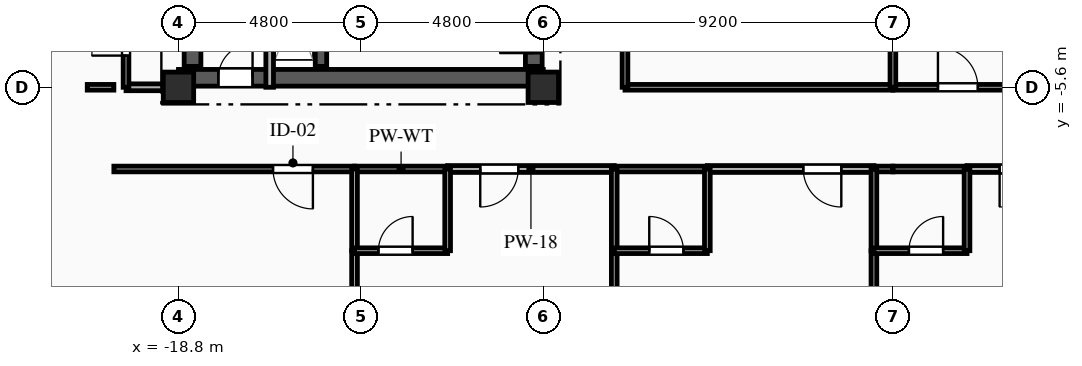
"""IFC4 building model, lengths in metres.
Left out: names, types, materials, properties, quantities, classifications, styles, units other than length and angle.
Written with IfcOpenShell. Run it as: python <this file> out.ifc"""

import sys

from ifc_helpers import new_model, si_unit, direction, frame, frame_2d, origin, origin_2d, place, context, subcontext, project, spatial, rectangle, extrude, element, fill, save


model = new_model("IFC4")
c1 = context("Model", 3, precision=1e-05, world=origin(), true_north=direction((0.0, 1.0)))
c2 = subcontext(c1, "Body", "Model", "MODEL_VIEW")
j1 = project(units=[si_unit("LENGTHUNIT", "METRE"), si_unit("PLANEANGLEUNIT", "RADIAN")], contexts=[c1])
p1 = place(None, origin())
s1 = spatial("IfcSite", under=j1, at=p1, CompositionType="ELEMENT")
p2 = place(p1, origin())
s2 = spatial("IfcBuilding", under=s1, at=p2, CompositionType="ELEMENT")
p3 = place(p2, frame((0.0, 0.0, 245.05)))
s3 = spatial("IfcBuildingStorey", under=s2, at=p3, CompositionType="ELEMENT", Elevation=245.05)
for number, where, z_axis, x_axis in (
    (1, (-18.8, -5.6, 0.0), (0.0, 0.0, 1.0), (1.0, 0.0, 0.0)),
    (2, (-9.2, -5.6, 0.0), (0.0, 0.0, 1.0), (1.0, 0.0, 0.0)),
):
    element("IfcColumn", number, at=place(p3, frame(where, z_axis=z_axis, x_axis=x_axis)), inside=s3, PredefinedType="COLUMN", context=c2, shape_type="SweptSolid", body=[
        extrude(rectangle(XDim=0.8, YDim=0.8, at=origin_2d()), origin(), (0.0, 0.0, 1.0), 3.35),
    ])
p4 = place(p3, frame((-18.8, -5.35, 0.0), z_axis=(0.0, 0.0, 1.0), x_axis=(1.0, 0.0, 0.0)))
e3 = element("IfcWall", 3, at=p4, inside=s3, PredefinedType="SHEAR", context=c2, shape_type="SweptSolid", body=[
    extrude(rectangle(XDim=9.6, YDim=0.44, at=frame_2d((4.8, 0.0))), origin(), (0.0, 0.0, 1.0), 3.04),
])
p5 = place(p4, frame((1.05, 0.0, 0.0)))
e4 = element("IfcOpeningElement", 4, at=p5, cuts=e3, PredefinedType="OPENING", context=c2, shape_type="SweptSolid", body=[
    extrude(rectangle(XDim=0.9, YDim=2.1, at=frame_2d((0.45, 1.05))), frame((0.0, 0.23, 0.0), z_axis=(0.0, -1.0, 0.0), x_axis=(1.0, 0.0, 0.0)), (0.0, 0.0, 1.0), 0.46),
])
p6 = place(p3, frame((-18.43, -5.05, 0.0), z_axis=(0.0, 0.0, 1.0), x_axis=(0.0, 1.0, 0.0)))
e5 = element("IfcWall", 5, at=p6, inside=s3, PredefinedType="SHEAR", context=c2, shape_type="SweptSolid", body=[
    extrude(rectangle(XDim=10.1, YDim=0.44, at=frame_2d((5.05, 0.0))), origin(), (0.0, 0.0, 1.0), 3.04),
])
p7 = place(p3, frame((-9.45, -5.05, 0.0), z_axis=(0.0, 0.0, 1.0), x_axis=(0.0, 1.0, 0.0)))
e6 = element("IfcWall", 6, at=p7, inside=s3, PredefinedType="SHEAR", context=c2, shape_type="SweptSolid", body=[
    extrude(rectangle(XDim=10.1, YDim=0.44, at=frame_2d((5.05, 0.0))), origin(), (0.0, 0.0, 1.0), 3.04),
])
p8 = place(p7, frame((7.15, 0.0, 0.0)))
e7 = element("IfcOpeningElement", 7, at=p8, cuts=e6, PredefinedType="OPENING", context=c2, shape_type="SweptSolid", body=[
    extrude(rectangle(XDim=0.9, YDim=2.1, at=frame_2d((0.45, 1.05))), frame((0.0, 0.23, 0.0), z_axis=(0.0, -1.0, 0.0), x_axis=(1.0, 0.0, 0.0)), (0.0, 0.0, 1.0), 0.46),
])
p9 = place(p7, frame((2.4, 0.0, 0.0)))
e8 = element("IfcOpeningElement", 8, at=p9, cuts=e6, PredefinedType="OPENING", context=c2, shape_type="SweptSolid", body=[
    extrude(rectangle(XDim=1.2, YDim=2.15, at=frame_2d((0.6, 1.075))), frame((0.0, 0.23, 0.0), z_axis=(0.0, -1.0, 0.0), x_axis=(1.0, 0.0, 0.0)), (0.0, 0.0, 1.0), 0.46),
])
p10 = place(p7, frame((0.35, 0.0, 0.0)))
e9 = element("IfcOpeningElement", 9, at=p10, cuts=e6, PredefinedType="OPENING", context=c2, shape_type="SweptSolid", body=[
    extrude(rectangle(XDim=0.9, YDim=2.1, at=frame_2d((0.45, 1.05))), frame((0.0, 0.23, 0.0), z_axis=(0.0, -1.0, 0.0), x_axis=(1.0, 0.0, 0.0)), (0.0, 0.0, 1.0), 0.46),
])
p11 = place(p7, frame((5.0, 0.0, 0.0)))
e10 = element("IfcOpeningElement", 10, at=p11, cuts=e6, PredefinedType="OPENING", context=c2, shape_type="SweptSolid", body=[
    extrude(rectangle(XDim=0.9, YDim=2.1, at=frame_2d((0.45, 1.05))), frame((0.0, 0.23, 0.0), z_axis=(0.0, -1.0, 0.0), x_axis=(1.0, 0.0, 0.0)), (0.0, 0.0, 1.0), 0.46),
])
p12 = place(p3, frame((-15.05, -5.05, 0.0), z_axis=(0.0, 0.0, 1.0), x_axis=(0.0, 1.0, 0.0)))
e11 = element("IfcWall", 11, at=p12, inside=s3, PredefinedType="SHEAR", context=c2, shape_type="SweptSolid", body=[
    extrude(rectangle(XDim=10.1, YDim=0.3, at=frame_2d((5.05, 0.0))), origin(), (0.0, 0.0, 1.0), 3.04),
])
p13 = place(p3, frame((-16.4, -5.6, 0.0), z_axis=(0.0, 0.0, 1.0), x_axis=(0.0, 1.0, 0.0)))
e12 = element("IfcWall", 12, at=p13, inside=s3, PredefinedType="PARTITIONING", context=c2, shape_type="SweptSolid", body=[
    extrude(rectangle(XDim=3.49, YDim=0.2, at=frame_2d((1.745, 0.0))), origin(), (0.0, 0.0, 1.0), 3.04),
])
p14 = place(p3, frame((-20.18, -5.6, 0.0), z_axis=(0.0, 0.0, 1.0), x_axis=(1.0, 0.0, 0.0)))
e13 = element("IfcWall", 13, at=p14, inside=s3, PredefinedType="PARTITIONING", context=c2, shape_type="SweptSolid", body=[
    extrude(rectangle(XDim=1.38, YDim=0.18, at=frame_2d((0.69, 0.0))), origin(), (0.0, 0.0, 1.0), 3.04),
])
p15 = place(p3, frame((-21.2, -5.6, 0.0), z_axis=(0.0, 0.0, 1.0), x_axis=(1.0, 0.0, 0.0)))
e14 = element("IfcWall", 14, at=p15, inside=s3, PredefinedType="PLUMBINGWALL", context=c2, shape_type="SweptSolid", body=[
    extrude(rectangle(XDim=0.7, YDim=0.15, at=frame_2d((0.35, 0.0))), origin(), (0.0, 0.0, 1.0), 3.04),
])
p16 = place(p3, frame((-14.167, -7.75, 0.0), z_axis=(0.0, 0.0, 1.0), x_axis=(-1.0, 0.0, 0.0)))
e15 = element("IfcWall", 15, at=p16, inside=s3, PredefinedType="PARTITIONING", context=c2, shape_type="SweptSolid", body=[
    extrude(rectangle(XDim=6.333, YDim=0.15, at=frame_2d((3.167, 0.0))), origin(), (0.0, 0.0, 1.0), 3.04),
])
p17 = place(p16, frame((1.095, 0.0, 0.0)))
e16 = element("IfcOpeningElement", 16, at=p17, cuts=e15, PredefinedType="OPENING", context=c2, shape_type="SweptSolid", body=[
    extrude(rectangle(XDim=1.05, YDim=2.15, at=frame_2d((0.525, 1.075))), frame((0.0, 0.085, 0.0), z_axis=(0.0, -1.0, 0.0), x_axis=(1.0, 0.0, 0.0)), (0.0, 0.0, 1.0), 0.17),
])
p18 = place(p3, frame((-7.333, -7.75, 0.0), z_axis=(0.0, 0.0, 1.0), x_axis=(-1.0, 0.0, 0.0)))
e17 = element("IfcWall", 17, at=p18, inside=s3, PredefinedType="PARTITIONING", context=c2, shape_type="SweptSolid", body=[
    extrude(rectangle(XDim=4.384, YDim=0.18, at=frame_2d((2.192, 0.0))), origin(), (0.0, 0.0, 1.0), 3.04),
])
p19 = place(p18, frame((2.526, 0.0, 0.0)))
e18 = element("IfcOpeningElement", 18, at=p19, cuts=e17, PredefinedType="OPENING", context=c2, shape_type="SweptSolid", body=[
    extrude(rectangle(XDim=1.0, YDim=2.15, at=frame_2d((0.5, 1.075))), frame((0.0, 0.1, 0.0), z_axis=(0.0, -1.0, 0.0), x_axis=(1.0, 0.0, 0.0)), (0.0, 0.0, 1.0), 0.2),
])
p20 = place(p3, frame((-11.717, -7.75, 0.0), z_axis=(0.0, 0.0, 1.0), x_axis=(-1.0, 0.0, 0.0)))
e19 = element("IfcWall", 19, at=p20, inside=s3, PredefinedType="PLUMBINGWALL", context=c2, shape_type="SweptSolid", body=[
    extrude(rectangle(XDim=2.45, YDim=0.15, at=frame_2d((1.225, 0.0))), origin(), (0.0, 0.0, 1.0), 3.04),
])
p21 = place(p3, frame((-0.5, -7.75, 0.0), z_axis=(0.0, 0.0, 1.0), x_axis=(-1.0, 0.0, 0.0)))
e20 = element("IfcWall", 20, at=p21, inside=s3, PredefinedType="PARTITIONING", context=c2, shape_type="SweptSolid", body=[
    extrude(rectangle(XDim=4.383, YDim=0.18, at=frame_2d((2.191, 0.0))), origin(), (0.0, 0.0, 1.0), 3.04),
])
p22 = place(p21, frame((0.858, 0.0, 0.0)))
e21 = element("IfcOpeningElement", 21, at=p22, cuts=e20, PredefinedType="OPENING", context=c2, shape_type="SweptSolid", body=[
    extrude(rectangle(XDim=1.0, YDim=2.15, at=frame_2d((0.5, 1.075))), frame((0.0, 0.1, 0.0), z_axis=(0.0, -1.0, 0.0), x_axis=(1.0, 0.0, 0.0)), (0.0, 0.0, 1.0), 0.2),
])
p23 = place(p3, frame((-4.883, -7.75, 0.0), z_axis=(0.0, 0.0, 1.0), x_axis=(-1.0, 0.0, 0.0)))
e22 = element("IfcWall", 22, at=p23, inside=s3, PredefinedType="PLUMBINGWALL", context=c2, shape_type="SweptSolid", body=[
    extrude(rectangle(XDim=2.45, YDim=0.15, at=frame_2d((1.225, 0.0))), origin(), (0.0, 0.0, 1.0), 3.04),
])
p24 = place(p3, frame((0.0, -7.75, 0.0), z_axis=(0.0, 0.0, 1.0), x_axis=(-1.0, 0.0, 0.0)))
e23 = element("IfcWall", 23, at=p24, inside=s3, PredefinedType="PLUMBINGWALL", context=c2, shape_type="SweptSolid", body=[
    extrude(rectangle(XDim=0.5, YDim=0.15, at=frame_2d((0.25, 0.0))), origin(), (0.0, 0.0, 1.0), 3.04),
])
p25 = place(p3, frame((-7.05, -5.6, 0.0), z_axis=(0.0, 0.0, 1.0), x_axis=(1.0, 0.0, 0.0)))
e24 = element("IfcWall", 24, at=p25, inside=s3, PredefinedType="PARTITIONING", context=c2, shape_type="SweptSolid", body=[
    extrude(rectangle(XDim=7.05, YDim=0.15, at=frame_2d((3.525, 0.0))), origin(), (0.0, 0.0, 1.0), 2.525),
])
p26 = place(p3, frame((6.333, -7.75, 0.0), z_axis=(0.0, 0.0, 1.0), x_axis=(-1.0, 0.0, 0.0)))
e25 = element("IfcWall", 25, at=p26, inside=s3, PredefinedType="PARTITIONING", context=c2, shape_type="SweptSolid", body=[
    extrude(rectangle(XDim=4.383, YDim=0.18, at=frame_2d((2.191, 0.0))), origin(), (0.0, 0.0, 1.0), 3.04),
])
p27 = place(p26, frame((2.525, 0.0, 0.0)))
e26 = element("IfcOpeningElement", 26, at=p27, cuts=e25, PredefinedType="OPENING", context=c2, shape_type="SweptSolid", body=[
    extrude(rectangle(XDim=1.0, YDim=2.15, at=frame_2d((0.5, 1.075))), frame((0.0, 0.1, 0.0), z_axis=(0.0, -1.0, 0.0), x_axis=(1.0, 0.0, 0.0)), (0.0, 0.0, 1.0), 0.2),
])
p28 = place(p3, frame((1.95, -7.75, 0.0), z_axis=(0.0, 0.0, 1.0), x_axis=(-1.0, 0.0, 0.0)))
e27 = element("IfcWall", 27, at=p28, inside=s3, PredefinedType="PLUMBINGWALL", context=c2, shape_type="SweptSolid", body=[
    extrude(rectangle(XDim=1.95, YDim=0.15, at=frame_2d((0.975, 0.0))), origin(), (0.0, 0.0, 1.0), 3.04),
])
p29 = place(p3, frame((0.0, -5.6, 0.0), z_axis=(0.0, 0.0, 1.0), x_axis=(1.0, 0.0, 0.0)))
e28 = element("IfcWall", 28, at=p29, inside=s3, PredefinedType="PARTITIONING", context=c2, shape_type="SweptSolid", body=[
    extrude(rectangle(XDim=7.05, YDim=0.15, at=frame_2d((3.525, 0.0))), origin(), (0.0, 0.0, 1.0), 2.525),
])
p30 = place(p29, frame((1.185, 0.0, 0.0)))
e29 = element("IfcOpeningElement", 29, at=p30, cuts=e28, PredefinedType="OPENING", context=c2, shape_type="SweptSolid", body=[
    extrude(rectangle(XDim=1.05, YDim=2.15, at=frame_2d((0.525, 1.075))), frame((0.0, 0.085, 0.0), z_axis=(0.0, -1.0, 0.0), x_axis=(1.0, 0.0, 0.0)), (0.0, 0.0, 1.0), 0.17),
])
p31 = place(p3, frame((-7.05, 8.5, 0.0), z_axis=(0.0, 0.0, 1.0), x_axis=(0.0, -1.0, 0.0)))
e30 = element("IfcWall", 30, at=p31, inside=s3, PredefinedType="PARTITIONING", context=c2, shape_type="SweptSolid", body=[
    extrude(rectangle(XDim=14.1, YDim=0.15, at=frame_2d((7.05, 0.0))), origin(), (0.0, 0.0, 1.0), 3.04),
])
p32 = place(p31, frame((8.011, 0.0, 0.0)))
e31 = element("IfcOpeningElement", 31, at=p32, cuts=e30, PredefinedType="OPENING", context=c2, shape_type="SweptSolid", body=[
    extrude(rectangle(XDim=1.05, YDim=2.15, at=frame_2d((0.525, 1.075))), frame((0.0, 0.085, 0.0), z_axis=(0.0, -1.0, 0.0), x_axis=(1.0, 0.0, 0.0)), (0.0, 0.0, 1.0), 0.17),
])
p33 = place(p3, frame((-20.18, -5.6, 0.0), z_axis=(0.0, 0.0, 1.0), x_axis=(0.0, 1.0, 0.0)))
e32 = element("IfcWall", 32, at=p33, inside=s3, PredefinedType="PLUMBINGWALL", context=c2, shape_type="SweptSolid", body=[
    extrude(rectangle(XDim=2.35, YDim=0.15, at=frame_2d((1.175, 0.0))), origin(), (0.0, 0.0, 1.0), 3.04),
])
p34 = place(p33, frame((0.834, 0.0, 0.0)))
e33 = element("IfcOpeningElement", 33, at=p34, cuts=e32, PredefinedType="OPENING", context=c2, shape_type="SweptSolid", body=[
    extrude(rectangle(XDim=0.9, YDim=2.1, at=frame_2d((0.45, 1.05))), frame((0.0, 0.085, 0.0), z_axis=(0.0, -1.0, 0.0), x_axis=(1.0, 0.0, 0.0)), (0.0, 0.0, 1.0), 0.17),
])
p35 = place(p3, frame((-14.167, -9.9, 0.0), z_axis=(0.0, 0.0, 1.0), x_axis=(0.0, -1.0, 0.0)))
e34 = element("IfcWall", 34, at=p35, inside=s3, PredefinedType="PARTITIONING", context=c2, shape_type="SweptSolid", body=[
    extrude(rectangle(XDim=8.5, YDim=0.15, at=frame_2d((4.25, 0.0))), origin(), (0.0, 0.0, 1.0), 3.04),
])
p36 = place(p3, frame((-14.167, -7.75, 0.0), z_axis=(0.0, 0.0, 1.0), x_axis=(0.0, -1.0, 0.0)))
e35 = element("IfcWall", 35, at=p36, inside=s3, PredefinedType="PLUMBINGWALL", context=c2, shape_type="SweptSolid", body=[
    extrude(rectangle(XDim=2.15, YDim=0.15, at=frame_2d((1.075, 0.0))), origin(), (0.0, 0.0, 1.0), 3.04),
])
p37 = place(p3, frame((-14.167, -9.9, 0.0), z_axis=(0.0, 0.0, 1.0), x_axis=(1.0, 0.0, 0.0)))
e36 = element("IfcWall", 36, at=p37, inside=s3, PredefinedType="PLUMBINGWALL", context=c2, shape_type="SweptSolid", body=[
    extrude(rectangle(XDim=2.45, YDim=0.15, at=frame_2d((1.225, 0.0))), origin(), (0.0, 0.0, 1.0), 3.04),
])
p38 = place(p37, frame((0.629, 0.0, 0.0)))
e37 = element("IfcOpeningElement", 37, at=p38, cuts=e36, PredefinedType="OPENING", context=c2, shape_type="SweptSolid", body=[
    extrude(rectangle(XDim=0.9, YDim=2.1, at=frame_2d((0.45, 1.05))), frame((0.0, 0.085, 0.0), z_axis=(0.0, -1.0, 0.0), x_axis=(1.0, 0.0, 0.0)), (0.0, 0.0, 1.0), 0.17),
])
p39 = place(p3, frame((-11.717, -9.9, 0.0), z_axis=(0.0, 0.0, 1.0), x_axis=(0.0, 1.0, 0.0)))
e38 = element("IfcWall", 38, at=p39, inside=s3, PredefinedType="PLUMBINGWALL", context=c2, shape_type="SweptSolid", body=[
    extrude(rectangle(XDim=2.15, YDim=0.15, at=frame_2d((1.075, 0.0))), origin(), (0.0, 0.0, 1.0), 3.04),
])
p40 = place(p3, frame((-7.333, -9.9, 0.0), z_axis=(0.0, 0.0, 1.0), x_axis=(0.0, -1.0, 0.0)))
e39 = element("IfcWall", 39, at=p40, inside=s3, PredefinedType="PARTITIONING", context=c2, shape_type="SweptSolid", body=[
    extrude(rectangle(XDim=8.5, YDim=0.15, at=frame_2d((4.25, 0.0))), origin(), (0.0, 0.0, 1.0), 2.665),
])
p41 = place(p3, frame((-7.333, -7.75, 0.0), z_axis=(0.0, 0.0, 1.0), x_axis=(0.0, -1.0, 0.0)))
e40 = element("IfcWall", 40, at=p41, inside=s3, PredefinedType="PLUMBINGWALL", context=c2, shape_type="SweptSolid", body=[
    extrude(rectangle(XDim=2.15, YDim=0.15, at=frame_2d((1.075, 0.0))), origin(), (0.0, 0.0, 1.0), 3.04),
])
p42 = place(p3, frame((-7.333, -9.9, 0.0), z_axis=(0.0, 0.0, 1.0), x_axis=(1.0, 0.0, 0.0)))
e41 = element("IfcWall", 41, at=p42, inside=s3, PredefinedType="PLUMBINGWALL", context=c2, shape_type="SweptSolid", body=[
    extrude(rectangle(XDim=2.45, YDim=0.15, at=frame_2d((1.225, 0.0))), origin(), (0.0, 0.0, 1.0), 3.04),
])
p43 = place(p42, frame((0.921, 0.0, 0.0)))
e42 = element("IfcOpeningElement", 42, at=p43, cuts=e41, PredefinedType="OPENING", context=c2, shape_type="SweptSolid", body=[
    extrude(rectangle(XDim=0.9, YDim=2.1, at=frame_2d((0.45, 1.05))), frame((0.0, 0.085, 0.0), z_axis=(0.0, -1.0, 0.0), x_axis=(1.0, 0.0, 0.0)), (0.0, 0.0, 1.0), 0.17),
])
p44 = place(p3, frame((-4.883, -9.9, 0.0), z_axis=(0.0, 0.0, 1.0), x_axis=(0.0, 1.0, 0.0)))
e43 = element("IfcWall", 43, at=p44, inside=s3, PredefinedType="PLUMBINGWALL", context=c2, shape_type="SweptSolid", body=[
    extrude(rectangle(XDim=2.15, YDim=0.15, at=frame_2d((1.075, 0.0))), origin(), (0.0, 0.0, 1.0), 3.04),
])
p45 = place(p3, frame((-0.5, -9.9, 0.0), z_axis=(0.0, 0.0, 1.0), x_axis=(0.0, -1.0, 0.0)))
e44 = element("IfcWall", 44, at=p45, inside=s3, PredefinedType="PARTITIONING", context=c2, shape_type="SweptSolid", body=[
    extrude(rectangle(XDim=8.5, YDim=0.15, at=frame_2d((4.25, 0.0))), origin(), (0.0, 0.0, 1.0), 3.04),
])
p46 = place(p3, frame((-0.5, -7.75, 0.0), z_axis=(0.0, 0.0, 1.0), x_axis=(0.0, -1.0, 0.0)))
e45 = element("IfcWall", 45, at=p46, inside=s3, PredefinedType="PLUMBINGWALL", context=c2, shape_type="SweptSolid", body=[
    extrude(rectangle(XDim=2.15, YDim=0.15, at=frame_2d((1.075, 0.0))), origin(), (0.0, 0.0, 1.0), 3.04),
])
p47 = place(p3, frame((-0.5, -9.9, 0.0), z_axis=(0.0, 0.0, 1.0), x_axis=(1.0, 0.0, 0.0)))
e46 = element("IfcWall", 46, at=p47, inside=s3, PredefinedType="PLUMBINGWALL", context=c2, shape_type="SweptSolid", body=[
    extrude(rectangle(XDim=2.45, YDim=0.15, at=frame_2d((1.225, 0.0))), origin(), (0.0, 0.0, 1.0), 3.04),
])
p48 = place(p47, frame((0.921, 0.0, 0.0)))
e47 = element("IfcOpeningElement", 47, at=p48, cuts=e46, PredefinedType="OPENING", context=c2, shape_type="SweptSolid", body=[
    extrude(rectangle(XDim=0.9, YDim=2.1, at=frame_2d((0.45, 1.05))), frame((0.0, 0.085, 0.0), z_axis=(0.0, -1.0, 0.0), x_axis=(1.0, 0.0, 0.0)), (0.0, 0.0, 1.0), 0.17),
])
p49 = place(p3, frame((1.95, -9.9, 0.0), z_axis=(0.0, 0.0, 1.0), x_axis=(0.0, 1.0, 0.0)))
e48 = element("IfcWall", 48, at=p49, inside=s3, PredefinedType="PLUMBINGWALL", context=c2, shape_type="SweptSolid", body=[
    extrude(rectangle(XDim=2.15, YDim=0.15, at=frame_2d((1.075, 0.0))), origin(), (0.0, 0.0, 1.0), 3.04),
])
p50 = place(p3, frame((0.0, 1.45, 0.0), z_axis=(0.0, 0.0, 1.0), x_axis=(0.0, -1.0, 0.0)))
e49 = element("IfcWall", 49, at=p50, inside=s3, PredefinedType="PARTITIONING", context=c2, shape_type="SweptSolid", body=[
    extrude(rectangle(XDim=7.05, YDim=0.15, at=frame_2d((3.525, 0.0))), origin(), (0.0, 0.0, 1.0), 3.04),
])
p51 = place(p5, origin())
e50 = element("IfcDoor", 50, at=p51, inside=s3, OperationType="SINGLE_SWING_RIGHT", PredefinedType="DOOR", context=c2, shape_type="SweptSolid", body=[
    extrude(rectangle(XDim=0.9, YDim=2.1, at=frame_2d((0.45, 1.05))), frame((0.0, 0.025, 0.0), z_axis=(0.0, -1.0, 0.0), x_axis=(1.0, 0.0, 0.0)), (0.0, 0.0, 1.0), 0.05),
])
fill(e4, e50)
p52 = place(p10, origin())
e51 = element("IfcDoor", 51, at=p52, inside=s3, OperationType="SINGLE_SWING_LEFT", PredefinedType="DOOR", context=c2, shape_type="SweptSolid", body=[
    extrude(rectangle(XDim=0.9, YDim=2.1, at=frame_2d((0.45, 1.05))), frame((0.0, 0.025, 0.0), z_axis=(0.0, -1.0, 0.0), x_axis=(1.0, 0.0, 0.0)), (0.0, 0.0, 1.0), 0.05),
])
fill(e9, e51)
p53 = place(p17, origin())
e52 = element("IfcDoor", 52, at=p53, inside=s3, OperationType="SINGLE_SWING_LEFT", PredefinedType="DOOR", context=c2, shape_type="SweptSolid", body=[
    extrude(rectangle(XDim=1.05, YDim=2.15, at=frame_2d((0.525, 1.075))), frame((0.0, 0.025, 0.0), z_axis=(0.0, -1.0, 0.0), x_axis=(1.0, 0.0, 0.0)), (0.0, 0.0, 1.0), 0.05),
])
fill(e16, e52)
p54 = place(p19, origin())
e53 = element("IfcDoor", 53, at=p54, inside=s3, OperationType="SINGLE_SWING_RIGHT", PredefinedType="DOOR", context=c2, shape_type="SweptSolid", body=[
    extrude(rectangle(XDim=1.0, YDim=2.15, at=frame_2d((0.5, 1.075))), frame((0.0, 0.025, 0.0), z_axis=(0.0, -1.0, 0.0), x_axis=(1.0, 0.0, 0.0)), (0.0, 0.0, 1.0), 0.05),
])
fill(e18, e53)
p55 = place(p22, origin())
e54 = element("IfcDoor", 54, at=p55, inside=s3, OperationType="SINGLE_SWING_LEFT", PredefinedType="DOOR", context=c2, shape_type="SweptSolid", body=[
    extrude(rectangle(XDim=1.0, YDim=2.15, at=frame_2d((0.5, 1.075))), frame((0.0, 0.025, 0.0), z_axis=(0.0, -1.0, 0.0), x_axis=(1.0, 0.0, 0.0)), (0.0, 0.0, 1.0), 0.05),
])
fill(e21, e54)
p56 = place(p27, origin())
e55 = element("IfcDoor", 55, at=p56, inside=s3, OperationType="SINGLE_SWING_RIGHT", PredefinedType="DOOR", context=c2, shape_type="SweptSolid", body=[
    extrude(rectangle(XDim=1.0, YDim=2.15, at=frame_2d((0.5, 1.075))), frame((0.0, 0.025, 0.0), z_axis=(0.0, -1.0, 0.0), x_axis=(1.0, 0.0, 0.0)), (0.0, 0.0, 1.0), 0.05),
])
fill(e26, e55)
p57 = place(p30, origin())
e56 = element("IfcDoor", 56, at=p57, inside=s3, OperationType="SINGLE_SWING_LEFT", PredefinedType="DOOR", context=c2, shape_type="SweptSolid", body=[
    extrude(rectangle(XDim=1.05, YDim=2.15, at=frame_2d((0.525, 1.075))), frame((0.0, 0.025, 0.0), z_axis=(0.0, -1.0, 0.0), x_axis=(1.0, 0.0, 0.0)), (0.0, 0.0, 1.0), 0.05),
])
fill(e29, e56)
p58 = place(p34, origin())
e57 = element("IfcDoor", 57, at=p58, inside=s3, OperationType="SINGLE_SWING_LEFT", PredefinedType="DOOR", context=c2, shape_type="SweptSolid", body=[
    extrude(rectangle(XDim=0.9, YDim=2.1, at=frame_2d((0.45, 1.05))), frame((0.0, 0.025, 0.0), z_axis=(0.0, -1.0, 0.0), x_axis=(1.0, 0.0, 0.0)), (0.0, 0.0, 1.0), 0.05),
])
fill(e33, e57)
p59 = place(p38, origin())
e58 = element("IfcDoor", 58, at=p59, inside=s3, OperationType="SINGLE_SWING_RIGHT", PredefinedType="DOOR", context=c2, shape_type="SweptSolid", body=[
    extrude(rectangle(XDim=0.9, YDim=2.1, at=frame_2d((0.45, 1.05))), frame((0.0, 0.025, 0.0), z_axis=(0.0, -1.0, 0.0), x_axis=(1.0, 0.0, 0.0)), (0.0, 0.0, 1.0), 0.05),
])
fill(e37, e58)
p60 = place(p43, origin())
e59 = element("IfcDoor", 59, at=p60, inside=s3, OperationType="SINGLE_SWING_LEFT", PredefinedType="DOOR", context=c2, shape_type="SweptSolid", body=[
    extrude(rectangle(XDim=0.9, YDim=2.1, at=frame_2d((0.45, 1.05))), frame((0.0, 0.025, 0.0), z_axis=(0.0, -1.0, 0.0), x_axis=(1.0, 0.0, 0.0)), (0.0, 0.0, 1.0), 0.05),
])
fill(e42, e59)
p61 = place(p48, origin())
e60 = element("IfcDoor", 60, at=p61, inside=s3, OperationType="SINGLE_SWING_RIGHT", PredefinedType="DOOR", context=c2, shape_type="SweptSolid", body=[
    extrude(rectangle(XDim=0.9, YDim=2.1, at=frame_2d((0.45, 1.05))), frame((0.0, 0.025, 0.0), z_axis=(0.0, -1.0, 0.0), x_axis=(1.0, 0.0, 0.0)), (0.0, 0.0, 1.0), 0.05),
])
fill(e47, e60)
save(model, sys.argv[1])
